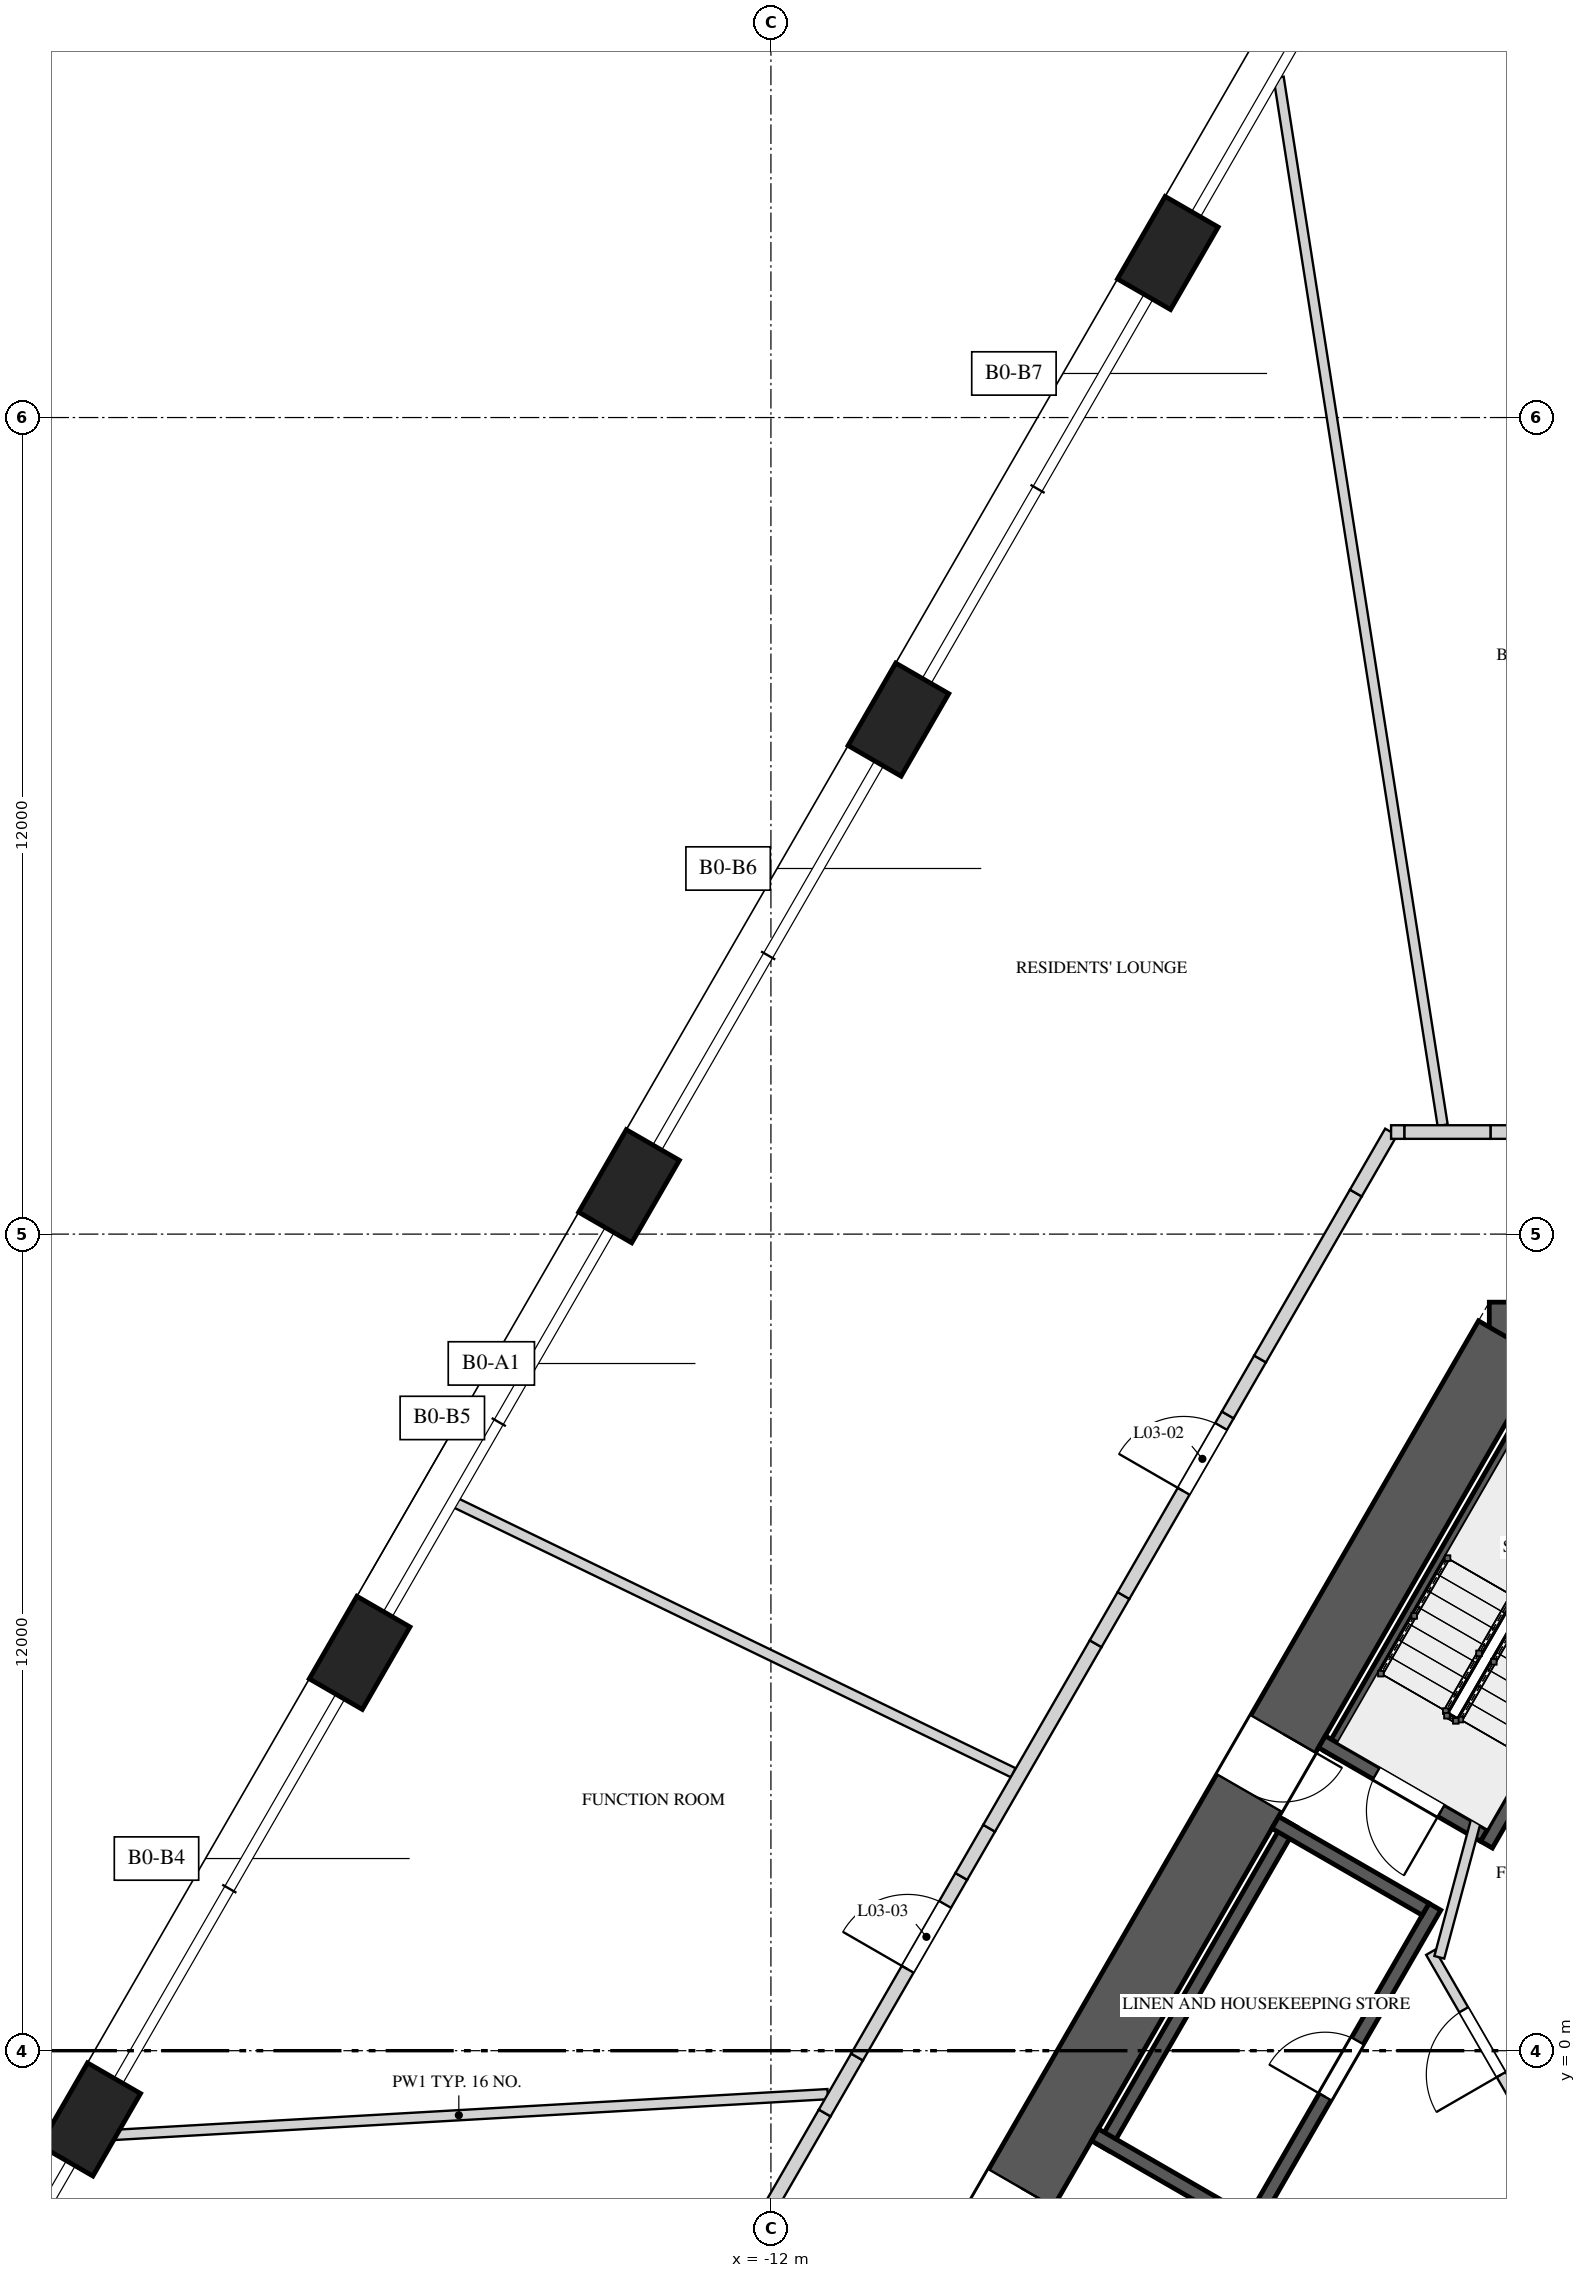
"""IFC4 building model, lengths in metres.
Left out: names, types, materials, properties, quantities, classifications, styles, units other than length and angle.
Written with IfcOpenShell. Run it as: python <this file> out.ifc"""

import sys

from ifc_helpers import new_model, si_unit, direction, frame, frame_2d, origin, origin_2d, place, context, subcontext, project, spatial, polyline, rectangle, outline, extrude, element, fill, save


model = new_model("IFC4")
c1 = context("Model", 3, precision=1e-05, world=origin(), true_north=direction((0.0, 1.0)))
c2 = subcontext(c1, "Body", "Model", "MODEL_VIEW")
j1 = project(units=[si_unit("LENGTHUNIT", "METRE"), si_unit("PLANEANGLEUNIT", "RADIAN")], contexts=[c1])
p1 = place(None, origin())
s1 = spatial("IfcSite", under=j1, at=p1, CompositionType="ELEMENT")
p2 = place(p1, origin())
s2 = spatial("IfcBuilding", under=s1, at=p2, CompositionType="ELEMENT")
p3 = place(p2, frame((0.0, 0.0, 20.0)))
s3 = spatial("IfcBuildingStorey", under=s2, at=p3, CompositionType="ELEMENT", Elevation=20.0)
p4 = place(p3, frame((1.443, 10.45, 0.0), z_axis=(0.0, 0.0, 1.0), x_axis=(-1.0, 0.0, 0.0)))
e1 = element("IfcWall", 1, at=p4, inside=s3, PredefinedType="SHEAR", context=c2, shape_type="SweptSolid", body=[
    extrude(rectangle(XDim=2.887, YDim=1.1, at=frame_2d((1.443, 0.0))), origin(), (0.0, 0.0, 1.0), 5.0),
])
p5 = place(p3, frame((-1.126, 10.45, 0.0), z_axis=(0.0, 0.0, 1.0), x_axis=(-0.500001757713, -0.866024388966, 0.0)))
e2 = element("IfcWall", 2, at=p5, inside=s3, PredefinedType="SHEAR", context=c2, shape_type="SweptSolid", body=[
    extrude(rectangle(XDim=16.974, YDim=1.1, at=frame_2d((8.487, 0.0))), origin(), (0.0, 0.0, 1.0), 5.0),
])
p6 = place(p5, frame((6.692, 0.0, 0.0)))
e3 = element("IfcOpeningElement", 3, at=p6, cuts=e2, PredefinedType="OPENING", context=c2, shape_type="SweptSolid", body=[
    extrude(rectangle(XDim=1.0, YDim=2.4, at=frame_2d((0.5, 1.2))), frame((0.0, 0.56, 0.0), z_axis=(0.0, -1.0, 0.0), x_axis=(1.0, 0.0, 0.0)), (0.0, 0.0, 1.0), 1.12),
])
p7 = place(p5, frame((14.397, 0.0, 0.0)))
e4 = element("IfcOpeningElement", 4, at=p7, cuts=e2, PredefinedType="OPENING", context=c2, shape_type="SweptSolid", body=[
    extrude(rectangle(XDim=0.8, YDim=2.1, at=frame_2d((0.4, 1.05))), frame((0.0, 0.56, 0.0), z_axis=(0.0, -1.0, 0.0), x_axis=(1.0, 0.0, 0.0)), (0.0, 0.0, 1.0), 1.12),
])
for number, where, z_axis, x_axis in (
    (5, (-6.167, 26.418, 0.0), (0.0, 0.0, 1.0), (-0.5, -0.866, 0.0)),
    (6, (-10.126, 19.561, 0.0), (0.0, 0.0, 1.0), (-0.5, -0.866, 0.0)),
    (7, (-14.085, 12.704, 0.0), (0.0, 0.0, 1.0), (-0.5, -0.866, 0.0)),
    (8, (-18.044, 5.846, 0.0), (0.0, 0.0, 1.0), (-0.5, -0.866, 0.0)),
    (9, (-22.003, -1.011, 0.0), (0.0, 0.0, 1.0), (-0.5, -0.866, 0.0)),
):
    element("IfcColumn", number, at=place(p3, frame(where, z_axis=z_axis, x_axis=x_axis)), inside=s3, PredefinedType="COLUMN", context=c2, shape_type="SweptSolid", body=[
        extrude(rectangle(XDim=1.4, YDim=0.9, at=origin_2d()), origin(), (0.0, 0.0, 1.0), 5.0),
    ])
p8 = place(p3, frame((-0.68, 9.722, 0.0), z_axis=(0.0, 0.0, 1.0), x_axis=(-0.49998037582, -0.866036733513, 0.0)))
e10 = element("IfcWall", 10, at=p8, inside=s3, PredefinedType="SOLIDWALL", context=c2, shape_type="SweptSolid", body=[
    extrude(rectangle(XDim=6.2, YDim=0.2, at=frame_2d((3.1, 0.0))), origin(), (0.0, 0.0, 1.0), 4.65),
])
p9 = place(p3, frame((1.646, 8.45, 0.0), z_axis=(0.0, 0.0, 1.0), x_axis=(-0.500006002103, -0.866021938441, 0.0)))
e11 = element("IfcWall", 11, at=p9, inside=s3, PredefinedType="SOLIDWALL", context=c2, shape_type="SweptSolid", body=[
    extrude(rectangle(XDim=6.261, YDim=0.2, at=frame_2d((3.13, 0.0))), origin(), (0.0, 0.0, 1.0), 4.65),
])
p10 = place(p3, frame((-1.521, 3.165, 0.0), z_axis=(0.0, 0.0, 1.0), x_axis=(-0.866027397988, 0.499996545922, 0.0)))
e12 = element("IfcWall", 12, at=p10, inside=s3, PredefinedType="SOLIDWALL", context=c2, shape_type="SweptSolid", body=[
    extrude(rectangle(XDim=2.75, YDim=0.2, at=frame_2d((1.375, 0.0))), origin(), (0.0, 0.0, 1.0), 4.65),
])
p11 = place(p10, frame((0.725, 0.0, 0.0)))
e13 = element("IfcOpeningElement", 13, at=p11, cuts=e12, PredefinedType="OPENING", context=c2, shape_type="SweptSolid", body=[
    extrude(rectangle(XDim=1.1, YDim=2.4, at=frame_2d((0.55, 1.2))), frame((0.0, 0.11, 0.0), z_axis=(0.0, -1.0, 0.0), x_axis=(1.0, 0.0, 0.0)), (0.0, 0.0, 1.0), 0.22),
])
p12 = place(p3, frame((-4.993, -2.648, 0.0), z_axis=(0.0, 0.0, 1.0), x_axis=(0.499996545922, 0.866027397988, 0.0)))
e14 = element("IfcWall", 14, at=p12, inside=s3, PredefinedType="SOLIDWALL", context=c2, shape_type="SweptSolid", body=[
    extrude(rectangle(XDim=5.5, YDim=0.2, at=frame_2d((2.75, 0.0))), origin(), (0.0, 0.0, 1.0), 4.65),
])
p13 = place(p12, frame((2.275, 0.0, 0.0)))
e15 = element("IfcOpeningElement", 15, at=p13, cuts=e14, PredefinedType="OPENING", context=c2, shape_type="SweptSolid", body=[
    extrude(rectangle(XDim=0.95, YDim=2.4, at=frame_2d((0.475, 1.2))), frame((0.0, 0.11, 0.0), z_axis=(0.0, -1.0, 0.0), x_axis=(1.0, 0.0, 0.0)), (0.0, 0.0, 1.0), 0.22),
])
p14 = place(p3, frame((-4.365, 3.34, 0.0), z_axis=(0.0, 0.0, 1.0), x_axis=(-0.499996545922, -0.866027397988, 0.0)))
e16 = element("IfcWall", 16, at=p14, inside=s3, PredefinedType="SOLIDWALL", context=c2, shape_type="SweptSolid", body=[
    extrude(rectangle(XDim=5.5, YDim=0.2, at=frame_2d((2.75, 0.0))), origin(), (0.0, 0.0, 1.0), 4.65),
])
for number, where, z_axis, x_axis in (
    (17, (-2.38, 2.078, 0.0), (0.0, 0.0, 1.0), (-0.866, 0.5, 0.0)),
    (18, (-5.03, -2.512, 0.0), (0.0, 0.0, 1.0), (-0.866, 0.5, 0.0)),
):
    element("IfcWall", number, at=place(p3, frame(where, z_axis=z_axis, x_axis=x_axis)), inside=s3, PredefinedType="SOLIDWALL", context=c2, shape_type="SweptSolid", body=[
        extrude(rectangle(XDim=2.55, YDim=0.2, at=frame_2d((1.275, 0.0))), origin(), (0.0, 0.0, 1.0), 4.65),
    ])
p15 = place(p3, frame((-0.744, -1.261, 0.0), z_axis=(0.0, 0.0, 1.0), x_axis=(-0.500004234368, 0.866022959057, 0.0)))
e19 = element("IfcWall", 19, at=p15, inside=s3, PredefinedType="PARTITIONING", context=c2, shape_type="SweptSolid", body=[
    extrude(rectangle(XDim=3.125, YDim=0.15, at=frame_2d((1.562, 0.0))), origin(), (0.0, 0.0, 1.0), 4.65),
])
p16 = place(p15, frame((1.05, 0.0, 0.0)))
e20 = element("IfcOpeningElement", 20, at=p16, cuts=e19, PredefinedType="OPENING", context=c2, shape_type="SweptSolid", body=[
    extrude(rectangle(XDim=1.1, YDim=2.4, at=frame_2d((0.55, 1.2))), frame((0.0, 0.085, 0.0), z_axis=(0.0, -1.0, 0.0), x_axis=(1.0, 0.0, 0.0)), (0.0, 0.0, 1.0), 0.17),
])
p17 = place(p3, frame((-2.178, 1.372, 0.0), z_axis=(0.0, 0.0, 1.0), x_axis=(0.258808958833, 0.96592852884, 0.0)))
e21 = element("IfcWall", 21, at=p17, inside=s3, PredefinedType="PARTITIONING", context=c2, shape_type="SweptSolid", body=[
    extrude(rectangle(XDim=2.903, YDim=0.15, at=frame_2d((1.451, 0.0))), origin(), (0.0, 0.0, 1.0), 4.65),
])
p18 = place(p3, frame((-1.51, 4.215, 0.0), z_axis=(0.0, 0.0, 1.0), x_axis=(0.866085525409, 0.49989585183, 0.0)))
e22 = element("IfcWall", 22, at=p18, inside=s3, PredefinedType="PARTITIONING", context=c2, shape_type="SweptSolid", body=[
    extrude(rectangle(XDim=1.3, YDim=0.15, at=frame_2d((0.65, 0.0))), origin(), (0.0, 0.0, 1.0), 4.65),
])
p19 = place(p3, frame((-11.165, -0.638, 0.0), z_axis=(0.0, 0.0, 1.0), x_axis=(-0.998369760977, -0.057077319203, 0.0)))
e23 = element("IfcWall", 23, at=p19, inside=s3, PredefinedType="PARTITIONING", context=c2, shape_type="SweptSolid", body=[
    extrude(rectangle(XDim=10.86, YDim=0.15, at=frame_2d((5.43, 0.0))), origin(), (0.0, 0.0, 1.0), 3.75),
])
p20 = place(p3, frame((-8.438, 4.085, 0.0), z_axis=(0.0, 0.0, 1.0), x_axis=(-0.900092423944, 0.435699011197, 0.0)))
e24 = element("IfcWall", 24, at=p20, inside=s3, PredefinedType="PARTITIONING", context=c2, shape_type="SweptSolid", body=[
    extrude(rectangle(XDim=9.104, YDim=0.15, at=frame_2d((4.552, 0.0))), origin(), (0.0, 0.0, 1.0), 4.65),
])
p21 = place(p3, frame((-2.129, 13.6, 0.0), z_axis=(0.0, 0.0, 1.0), x_axis=(-0.154659289673, 0.987967865934, 0.0)))
e25 = element("IfcWall", 25, at=p21, inside=s3, PredefinedType="PARTITIONING", context=c2, shape_type="SweptSolid", body=[
    extrude(rectangle(XDim=15.585, YDim=0.15, at=frame_2d((7.792, 0.0))), origin(), (0.0, 0.0, 1.0), 4.65),
])
p22 = place(p3, frame((-12.617, -3.354, 0.0), z_axis=(0.0, 0.0, 1.0), x_axis=(0.49993514545, 0.866062844338, 0.0)))
e26 = element("IfcWall", 26, at=p22, inside=s3, PredefinedType="SOLIDWALL", context=c2, shape_type="SweptSolid", body=[
    extrude(rectangle(XDim=2.815, YDim=0.2, at=frame_2d((1.408, 0.0))), origin(), (0.0, 0.0, 1.0), 4.65),
])
p23 = place(p3, frame((-11.209, -0.915, 0.0), z_axis=(0.0, 0.0, 1.0), x_axis=(0.500174821557, 0.865924446982, 0.0)))
e27 = element("IfcWall", 27, at=p23, inside=s3, PredefinedType="SOLIDWALL", context=c2, shape_type="SweptSolid", body=[
    extrude(rectangle(XDim=0.95, YDim=0.2, at=frame_2d((0.475, 0.0))), origin(), (0.0, 0.0, 1.0), 3.75),
])
p24 = place(p3, frame((-10.734, -0.093, 0.0), z_axis=(0.0, 0.0, 1.0), x_axis=(0.499952348839, 0.866052913447, 0.0)))
e28 = element("IfcWall", 28, at=p24, inside=s3, PredefinedType="SOLIDWALL", context=c2, shape_type="SweptSolid", body=[
    extrude(rectangle(XDim=3.064, YDim=0.2, at=frame_2d((1.532, 0.0))), origin(), (0.0, 0.0, 1.0), 4.65),
])
p25 = place(p24, frame((1.489, 0.0, 0.0)))
e29 = element("IfcOpeningElement", 29, at=p25, cuts=e28, PredefinedType="OPENING", context=c2, shape_type="SweptSolid", body=[
    extrude(rectangle(XDim=1.1, YDim=2.4, at=frame_2d((0.55, 1.2))), frame((0.0, 0.11, 0.0), z_axis=(0.0, -1.0, 0.0), x_axis=(1.0, 0.0, 0.0)), (0.0, 0.0, 1.0), 0.22),
])
p26 = place(p3, frame((-9.202, 2.561, 0.0), z_axis=(0.0, 0.0, 1.0), x_axis=(0.500118501653, 0.865956976012, 0.0)))
e30 = element("IfcWall", 30, at=p26, inside=s3, PredefinedType="SOLIDWALL", context=c2, shape_type="SweptSolid", body=[
    extrude(rectangle(XDim=0.818, YDim=0.2, at=frame_2d((0.409, 0.0))), origin(), (0.0, 0.0, 1.0), 3.75),
])
p27 = place(p3, frame((-8.793, 3.27, 0.0), z_axis=(0.0, 0.0, 1.0), x_axis=(0.499947505232, 0.866055709532, 0.0)))
e31 = element("IfcWall", 31, at=p27, inside=s3, PredefinedType="SOLIDWALL", context=c2, shape_type="SweptSolid", body=[
    extrude(rectangle(XDim=3.13, YDim=0.2, at=frame_2d((1.565, 0.0))), origin(), (0.0, 0.0, 1.0), 4.65),
])
p28 = place(p3, frame((-7.228, 5.98, 0.0), z_axis=(0.0, 0.0, 1.0), x_axis=(0.500118501653, 0.865956976012, 0.0)))
e32 = element("IfcWall", 32, at=p28, inside=s3, PredefinedType="SOLIDWALL", context=c2, shape_type="SweptSolid", body=[
    extrude(rectangle(XDim=0.818, YDim=0.2, at=frame_2d((0.409, 0.0))), origin(), (0.0, 0.0, 1.0), 3.75),
])
p29 = place(p3, frame((-6.819, 6.689, 0.0), z_axis=(0.0, 0.0, 1.0), x_axis=(0.499952348839, 0.866052913447, 0.0)))
e33 = element("IfcWall", 33, at=p29, inside=s3, PredefinedType="SOLIDWALL", context=c2, shape_type="SweptSolid", body=[
    extrude(rectangle(XDim=3.064, YDim=0.2, at=frame_2d((1.532, 0.0))), origin(), (0.0, 0.0, 1.0), 4.65),
])
p30 = place(p29, frame((1.769, 0.0, 0.0)))
e34 = element("IfcOpeningElement", 34, at=p30, cuts=e33, PredefinedType="OPENING", context=c2, shape_type="SweptSolid", body=[
    extrude(rectangle(XDim=1.1, YDim=2.4, at=frame_2d((0.55, 1.2))), frame((0.0, 0.11, 0.0), z_axis=(0.0, -1.0, 0.0), x_axis=(1.0, 0.0, 0.0)), (0.0, 0.0, 1.0), 0.22),
])
p31 = place(p3, frame((-5.287, 9.343, 0.0), z_axis=(0.0, 0.0, 1.0), x_axis=(0.500174821557, 0.865924446982, 0.0)))
e35 = element("IfcWall", 35, at=p31, inside=s3, PredefinedType="SOLIDWALL", context=c2, shape_type="SweptSolid", body=[
    extrude(rectangle(XDim=0.95, YDim=0.2, at=frame_2d((0.475, 0.0))), origin(), (0.0, 0.0, 1.0), 3.75),
])
p32 = place(p3, frame((-4.812, 10.165, 0.0), z_axis=(0.0, 0.0, 1.0), x_axis=(0.500000186108, 0.866025296335, 0.0)))
e36 = element("IfcWall", 36, at=p32, inside=s3, PredefinedType="SOLIDWALL", context=c2, shape_type="SweptSolid", body=[
    extrude(rectangle(XDim=2.815, YDim=0.2, at=frame_2d((1.408, 0.0))), origin(), (0.0, 0.0, 1.0), 4.65),
])
p33 = place(p3, frame((-3.404, 12.604, 0.0), z_axis=(0.0, 0.0, 1.0), x_axis=(0.499994660107, 0.866028486751, 0.0)))
e37 = element("IfcWall", 37, at=p33, inside=s3, PredefinedType="SOLIDWALL", context=c2, shape_type="SweptSolid", body=[
    extrude(rectangle(XDim=1.035, YDim=0.2, at=frame_2d((0.518, 0.0))), origin(), (0.0, 0.0, 1.0), 3.55),
])
p34 = place(p3, frame((-2.887, 13.5, 0.0), z_axis=(0.0, 0.0, 1.0), x_axis=(1.0, 0.0, 0.0)))
e38 = element("IfcWall", 38, at=p34, inside=s3, PredefinedType="SOLIDWALL", context=c2, shape_type="SweptSolid", body=[
    extrude(rectangle(XDim=0.197, YDim=0.2, at=frame_2d((0.099, 0.0))), origin(), (0.0, 0.0, 1.0), 3.55),
])
p35 = place(p3, frame((-2.689, 13.5, 0.0), z_axis=(0.0, 0.0, 1.0), x_axis=(1.0, 0.0, 0.0)))
e39 = element("IfcWall", 39, at=p35, inside=s3, PredefinedType="SOLIDWALL", context=c2, shape_type="SweptSolid", body=[
    extrude(rectangle(XDim=1.267, YDim=0.2, at=frame_2d((0.633, 0.0))), origin(), (0.0, 0.0, 1.0), 4.65),
])
p36 = place(p3, frame((-1.423, 13.5, 0.0), z_axis=(0.0, 0.0, 1.0), x_axis=(1.0, 0.0, 0.0)))
e40 = element("IfcWall", 40, at=p36, inside=s3, PredefinedType="SOLIDWALL", context=c2, shape_type="SweptSolid", body=[
    extrude(outline(polyline([(0.0, 0.0), (1.602, 0.0), (1.602, 4.65), (0.902, 4.65), (0.902, 3.55), (0.0, 3.55), (0.0, 0.0)])), frame((0.0, 0.1, 0.0), z_axis=(0.0, -1.0, 0.0), x_axis=(1.0, 0.0, 0.0)), (0.0, 0.0, 1.0), 0.2),
])
p37 = place(p36, frame((0.452, 0.0, 0.0)))
e41 = element("IfcOpeningElement", 41, at=p37, cuts=e40, PredefinedType="OPENING", context=c2, shape_type="SweptSolid", body=[
    extrude(rectangle(XDim=1.1, YDim=2.4, at=frame_2d((0.55, 1.2))), frame((0.0, 0.11, 0.0), z_axis=(0.0, -1.0, 0.0), x_axis=(1.0, 0.0, 0.0)), (0.0, 0.0, 1.0), 0.22),
])
p38 = place(p11, origin())
e42 = element("IfcDoor", 42, at=p38, inside=s3, OperationType="SINGLE_SWING_RIGHT", PredefinedType="DOOR", context=c2, shape_type="SweptSolid", body=[
    extrude(rectangle(XDim=1.1, YDim=2.4, at=frame_2d((0.55, 1.2))), frame((0.0, 0.025, 0.0), z_axis=(0.0, -1.0, 0.0), x_axis=(1.0, 0.0, 0.0)), (0.0, 0.0, 1.0), 0.05),
])
fill(e13, e42)
p39 = place(p13, origin())
e43 = element("IfcDoor", 43, at=p39, inside=s3, OperationType="SINGLE_SWING_LEFT", PredefinedType="DOOR", context=c2, shape_type="SweptSolid", body=[
    extrude(rectangle(XDim=0.95, YDim=2.4, at=frame_2d((0.475, 1.2))), frame((0.0, 0.025, 0.0), z_axis=(0.0, -1.0, 0.0), x_axis=(1.0, 0.0, 0.0)), (0.0, 0.0, 1.0), 0.05),
])
fill(e15, e43)
p40 = place(p16, origin())
e44 = element("IfcDoor", 44, at=p40, inside=s3, OperationType="SINGLE_SWING_RIGHT", PredefinedType="DOOR", context=c2, shape_type="SweptSolid", body=[
    extrude(rectangle(XDim=1.1, YDim=2.4, at=frame_2d((0.55, 1.2))), frame((0.0, 0.025, 0.0), z_axis=(0.0, -1.0, 0.0), x_axis=(1.0, 0.0, 0.0)), (0.0, 0.0, 1.0), 0.05),
])
fill(e20, e44)
p41 = place(p6, origin())
e45 = element("IfcDoor", 45, at=p41, inside=s3, OperationType="SINGLE_SWING_LEFT", PredefinedType="DOOR", context=c2, shape_type="SweptSolid", body=[
    extrude(rectangle(XDim=1.0, YDim=2.4, at=frame_2d((0.5, 1.2))), frame((0.0, 0.025, 0.0), z_axis=(0.0, -1.0, 0.0), x_axis=(1.0, 0.0, 0.0)), (0.0, 0.0, 1.0), 0.05),
])
fill(e3, e45)
p42 = place(p7, origin())
e46 = element("IfcDoor", 46, at=p42, inside=s3, OperationType="SINGLE_SWING_RIGHT", PredefinedType="DOOR", context=c2, shape_type="SweptSolid", body=[
    extrude(rectangle(XDim=0.8, YDim=2.1, at=frame_2d((0.4, 1.05))), frame((0.0, 0.025, 0.0), z_axis=(0.0, -1.0, 0.0), x_axis=(1.0, 0.0, 0.0)), (0.0, 0.0, 1.0), 0.05),
])
fill(e4, e46)
p43 = place(p30, origin())
e47 = element("IfcDoor", 47, at=p43, inside=s3, OperationType="SINGLE_SWING_RIGHT", PredefinedType="DOOR", context=c2, shape_type="SweptSolid", body=[
    extrude(rectangle(XDim=1.1, YDim=2.4, at=frame_2d((0.55, 1.2))), frame((0.0, 0.025, 0.0), z_axis=(0.0, -1.0, 0.0), x_axis=(1.0, 0.0, 0.0)), (0.0, 0.0, 1.0), 0.05),
])
fill(e34, e47)
p44 = place(p25, origin())
e48 = element("IfcDoor", 48, at=p44, inside=s3, OperationType="SINGLE_SWING_LEFT", PredefinedType="DOOR", context=c2, shape_type="SweptSolid", body=[
    extrude(rectangle(XDim=1.1, YDim=2.4, at=frame_2d((0.55, 1.2))), frame((0.0, 0.025, 0.0), z_axis=(0.0, -1.0, 0.0), x_axis=(1.0, 0.0, 0.0)), (0.0, 0.0, 1.0), 0.05),
])
fill(e29, e48)
save(model, sys.argv[1])
